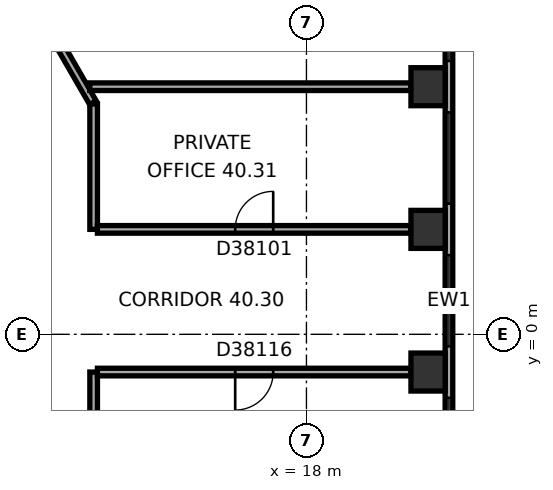
"""IFC4 building model, lengths in metres.
Left out: names, types, materials, properties, quantities, classifications, styles, units other than length and angle.
Written with IfcOpenShell. Run it as: python <this file> out.ifc"""

import sys

from ifc_helpers import new_model, si_unit, direction, frame, frame_2d, origin, origin_2d, place, context, subcontext, project, spatial, rectangle, extrude, element, fill, save


model = new_model("IFC4")
c1 = context("Model", 3, precision=1e-05, world=origin(), true_north=direction((0.0, 1.0)))
c2 = subcontext(c1, "Body", "Model", "MODEL_VIEW")
j1 = project(units=[si_unit("LENGTHUNIT", "METRE"), si_unit("PLANEANGLEUNIT", "RADIAN")], contexts=[c1])
p1 = place(None, origin())
s1 = spatial("IfcSite", under=j1, at=p1, CompositionType="ELEMENT")
p2 = place(p1, origin())
s2 = spatial("IfcBuilding", under=s1, at=p2, CompositionType="ELEMENT")
p3 = place(p2, frame((0.0, 0.0, 165.1)))
s3 = spatial("IfcBuildingStorey", under=s2, at=p3, CompositionType="ELEMENT", Elevation=165.1)
for number, where, z_axis, x_axis in (
    (1, (21.2, -0.993, 0.0), (0.0, 0.0, 1.0), (0.0, 1.0, 0.0)),
    (2, (21.2, 2.761, 0.0), (0.0, 0.0, 1.0), (0.0, 1.0, 0.0)),
    (3, (21.2, 6.515, 0.0), (0.0, 0.0, 1.0), (0.0, 1.0, 0.0)),
):
    element("IfcColumn", number, at=place(p3, frame(where, z_axis=z_axis, x_axis=x_axis)), inside=s3, PredefinedType="COLUMN", context=c2, shape_type="SweptSolid", body=[
        extrude(rectangle(XDim=1.0, YDim=0.9, at=origin_2d()), origin(), (0.0, 0.0, 1.0), 3.7),
    ])
p4 = place(p3, frame((21.75, -9.138, 0.0), z_axis=(0.0, 0.0, 1.0), x_axis=(0.0, 1.0, 0.0)))
e4 = element("IfcWall", 4, at=p4, inside=s3, PredefinedType="STANDARD", context=c2, shape_type="SweptSolid", body=[
    extrude(rectangle(XDim=20.044, YDim=0.2, at=frame_2d((10.022, 0.0))), origin(), (0.0, 0.0, 1.0), 3.7),
])
p5 = place(p4, frame((1.314, 0.0, 0.9)))
e5 = element("IfcOpeningElement", 5, at=p5, cuts=e4, PredefinedType="OPENING", context=c2, shape_type="SweptSolid", body=[
    extrude(rectangle(XDim=2.4, YDim=2.0, at=frame_2d((1.2, 1.0))), frame((0.0, 0.11, 0.0), z_axis=(0.0, -1.0, 0.0), x_axis=(1.0, 0.0, 0.0)), (0.0, 0.0, 1.0), 0.22),
])
p6 = place(p4, frame((5.069, 0.0, 0.9)))
e6 = element("IfcOpeningElement", 6, at=p6, cuts=e4, PredefinedType="OPENING", context=c2, shape_type="SweptSolid", body=[
    extrude(rectangle(XDim=2.4, YDim=2.0, at=frame_2d((1.2, 1.0))), frame((0.0, 0.11, 0.0), z_axis=(0.0, -1.0, 0.0), x_axis=(1.0, 0.0, 0.0)), (0.0, 0.0, 1.0), 0.22),
])
p7 = place(p4, frame((8.823, 0.0, 0.9)))
e7 = element("IfcOpeningElement", 7, at=p7, cuts=e4, PredefinedType="OPENING", context=c2, shape_type="SweptSolid", body=[
    extrude(rectangle(XDim=2.4, YDim=2.0, at=frame_2d((1.2, 1.0))), frame((0.0, 0.11, 0.0), z_axis=(0.0, -1.0, 0.0), x_axis=(1.0, 0.0, 0.0)), (0.0, 0.0, 1.0), 0.22),
])
p8 = place(p4, frame((12.577, 0.0, 0.9)))
e8 = element("IfcOpeningElement", 8, at=p8, cuts=e4, PredefinedType="OPENING", context=c2, shape_type="SweptSolid", body=[
    extrude(rectangle(XDim=2.4, YDim=2.0, at=frame_2d((1.2, 1.0))), frame((0.0, 0.11, 0.0), z_axis=(0.0, -1.0, 0.0), x_axis=(1.0, 0.0, 0.0)), (0.0, 0.0, 1.0), 0.22),
])
p9 = place(p4, frame((16.331, 0.0, 0.9)))
e9 = element("IfcOpeningElement", 9, at=p9, cuts=e4, PredefinedType="OPENING", context=c2, shape_type="SweptSolid", body=[
    extrude(rectangle(XDim=2.4, YDim=2.0, at=frame_2d((1.2, 1.0))), frame((0.0, 0.11, 0.0), z_axis=(0.0, -1.0, 0.0), x_axis=(1.0, 0.0, 0.0)), (0.0, 0.0, 1.0), 0.22),
])
p10 = place(p3, frame((12.38, 6.097, 0.0), z_axis=(0.0, 0.0, 1.0), x_axis=(-0.499964847546, 0.866045698112, 0.0)))
e10 = element("IfcWall", 10, at=p10, inside=s3, PredefinedType="PARTITIONING", context=c2, shape_type="SweptSolid", body=[
    extrude(rectangle(XDim=1.86, YDim=0.2, at=frame_2d((0.93, 0.0))), origin(), (0.0, 0.0, 1.0), 3.42),
])
p11 = place(p3, frame((12.4, -6.022, 0.0), z_axis=(0.0, 0.0, 1.0), x_axis=(0.0, 1.0, 0.0)))
e11 = element("IfcWall", 11, at=p11, inside=s3, PredefinedType="PARTITIONING", context=c2, shape_type="SweptSolid", body=[
    extrude(rectangle(XDim=5.029, YDim=0.2, at=frame_2d((2.515, 0.0))), origin(), (0.0, 0.0, 1.0), 3.42),
])
p12 = place(p3, frame((12.4, 2.761, 0.0), z_axis=(0.0, 0.0, 1.0), x_axis=(0.0, 1.0, 0.0)))
e12 = element("IfcWall", 12, at=p12, inside=s3, PredefinedType="PARTITIONING", context=c2, shape_type="SweptSolid", body=[
    extrude(rectangle(XDim=3.301, YDim=0.2, at=frame_2d((1.65, 0.0))), origin(), (0.0, 0.0, 1.0), 3.42),
])
p13 = place(p3, frame((12.5, -0.993, 0.0), z_axis=(0.0, 0.0, 1.0), x_axis=(1.0, 0.0, 0.0)))
e13 = element("IfcWall", 13, at=p13, inside=s3, PredefinedType="PARTITIONING", context=c2, shape_type="SweptSolid", body=[
    extrude(rectangle(XDim=8.25, YDim=0.2, at=frame_2d((4.125, 0.0))), origin(), (0.0, 0.0, 1.0), 2.87),
])
p14 = place(p13, frame((3.625, 0.0, 0.0)))
e14 = element("IfcOpeningElement", 14, at=p14, cuts=e13, PredefinedType="OPENING", context=c2, shape_type="SweptSolid", body=[
    extrude(rectangle(XDim=1.0, YDim=2.1, at=frame_2d((0.5, 1.05))), frame((0.0, 0.11, 0.0), z_axis=(0.0, -1.0, 0.0), x_axis=(1.0, 0.0, 0.0)), (0.0, 0.0, 1.0), 0.22),
])
p15 = place(p3, frame((20.75, 2.761, 0.0), z_axis=(0.0, 0.0, 1.0), x_axis=(-1.0, 0.0, 0.0)))
e15 = element("IfcWall", 15, at=p15, inside=s3, PredefinedType="PARTITIONING", context=c2, shape_type="SweptSolid", body=[
    extrude(rectangle(XDim=8.25, YDim=0.2, at=frame_2d((4.125, 0.0))), origin(), (0.0, 0.0, 1.0), 3.42),
])
p16 = place(p15, frame((3.625, 0.0, 0.0)))
e16 = element("IfcOpeningElement", 16, at=p16, cuts=e15, PredefinedType="OPENING", context=c2, shape_type="SweptSolid", body=[
    extrude(rectangle(XDim=1.0, YDim=2.1, at=frame_2d((0.5, 1.05))), frame((0.0, 0.11, 0.0), z_axis=(0.0, -1.0, 0.0), x_axis=(1.0, 0.0, 0.0)), (0.0, 0.0, 1.0), 0.22),
])
p17 = place(p3, frame((20.75, 6.515, 0.0), z_axis=(0.0, 0.0, 1.0), x_axis=(-1.0, 0.0, 0.0)))
e17 = element("IfcWall", 17, at=p17, inside=s3, PredefinedType="PARTITIONING", context=c2, shape_type="SweptSolid", body=[
    extrude(rectangle(XDim=8.452, YDim=0.2, at=frame_2d((4.226, 0.0))), origin(), (0.0, 0.0, 1.0), 3.42),
])
p18 = place(p6, origin())
e18 = element("IfcWindow", 18, at=p18, inside=s3, PartitioningType="SINGLE_PANEL", PredefinedType="WINDOW", context=c2, shape_type="SweptSolid", body=[
    extrude(rectangle(XDim=2.4, YDim=2.0, at=frame_2d((1.2, 1.0))), frame((0.0, 0.03, 0.0), z_axis=(0.0, -1.0, 0.0), x_axis=(1.0, 0.0, 0.0)), (0.0, 0.0, 1.0), 0.06),
])
fill(e6, e18)
p19 = place(p7, origin())
e19 = element("IfcWindow", 19, at=p19, inside=s3, PartitioningType="SINGLE_PANEL", PredefinedType="WINDOW", context=c2, shape_type="SweptSolid", body=[
    extrude(rectangle(XDim=2.4, YDim=2.0, at=frame_2d((1.2, 1.0))), frame((0.0, 0.03, 0.0), z_axis=(0.0, -1.0, 0.0), x_axis=(1.0, 0.0, 0.0)), (0.0, 0.0, 1.0), 0.06),
])
fill(e7, e19)
p20 = place(p8, origin())
e20 = element("IfcWindow", 20, at=p20, inside=s3, PartitioningType="SINGLE_PANEL", PredefinedType="WINDOW", context=c2, shape_type="SweptSolid", body=[
    extrude(rectangle(XDim=2.4, YDim=2.0, at=frame_2d((1.2, 1.0))), frame((0.0, 0.03, 0.0), z_axis=(0.0, -1.0, 0.0), x_axis=(1.0, 0.0, 0.0)), (0.0, 0.0, 1.0), 0.06),
])
fill(e8, e20)
p21 = place(p9, origin())
e21 = element("IfcWindow", 21, at=p21, inside=s3, PartitioningType="SINGLE_PANEL", PredefinedType="WINDOW", context=c2, shape_type="SweptSolid", body=[
    extrude(rectangle(XDim=2.4, YDim=2.0, at=frame_2d((1.2, 1.0))), frame((0.0, 0.03, 0.0), z_axis=(0.0, -1.0, 0.0), x_axis=(1.0, 0.0, 0.0)), (0.0, 0.0, 1.0), 0.06),
])
fill(e9, e21)
p22 = place(p16, origin())
e22 = element("IfcDoor", 22, at=p22, inside=s3, OperationType="SINGLE_SWING_LEFT", PredefinedType="DOOR", context=c2, shape_type="SweptSolid", body=[
    extrude(rectangle(XDim=1.0, YDim=2.1, at=frame_2d((0.5, 1.05))), frame((0.0, 0.025, 0.0), z_axis=(0.0, -1.0, 0.0), x_axis=(1.0, 0.0, 0.0)), (0.0, 0.0, 1.0), 0.05),
])
fill(e16, e22)
p23 = place(p14, origin())
e23 = element("IfcDoor", 23, at=p23, inside=s3, OperationType="SINGLE_SWING_LEFT", PredefinedType="DOOR", context=c2, shape_type="SweptSolid", body=[
    extrude(rectangle(XDim=1.0, YDim=2.1, at=frame_2d((0.5, 1.05))), frame((0.0, 0.025, 0.0), z_axis=(0.0, -1.0, 0.0), x_axis=(1.0, 0.0, 0.0)), (0.0, 0.0, 1.0), 0.05),
])
fill(e14, e23)
save(model, sys.argv[1])
